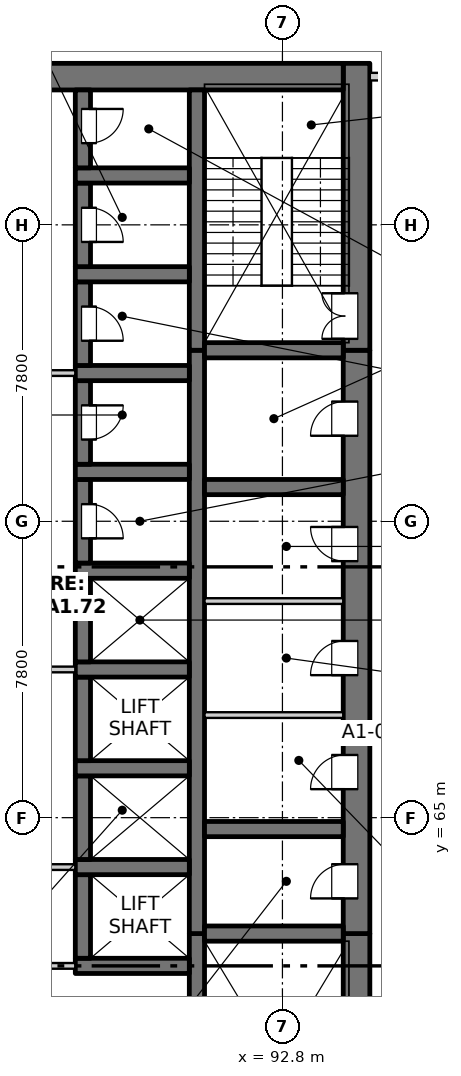
"""IFC4 building model, lengths in metres.
Left out: names, types, materials, properties, quantities, classifications, styles, units other than length and angle.
Written with IfcOpenShell. Run it as: python <this file> out.ifc"""

import sys

from ifc_helpers import new_model, si_unit, direction, frame, frame_2d, origin, place, context, subcontext, project, spatial, rectangle, extrude, element, fill, save


model = new_model("IFC4")
c1 = context("Model", 3, precision=1e-05, world=origin(), true_north=direction((0.0, 1.0)))
c2 = subcontext(c1, "Body", "Model", "MODEL_VIEW")
j1 = project(units=[si_unit("LENGTHUNIT", "METRE"), si_unit("PLANEANGLEUNIT", "RADIAN")], contexts=[c1])
p1 = place(None, origin())
s1 = spatial("IfcSite", under=j1, at=p1, CompositionType="ELEMENT")
p2 = place(p1, origin())
s2 = spatial("IfcBuilding", under=s1, at=p2, CompositionType="ELEMENT")
p3 = place(p2, frame((0.0, 0.0, 15.0)))
s3 = spatial("IfcBuildingStorey", under=s2, at=p3, CompositionType="ELEMENT", Elevation=15.0)
p4 = place(p3, frame((94.75, 54.9, -0.35), z_axis=(0.0, 0.0, 1.0), x_axis=(0.0, 1.0, 0.0)))
e1 = element("IfcWall", 1, at=p4, inside=s3, PredefinedType="SOLIDWALL", context=c2, shape_type="SweptSolid", body=[
    extrude(rectangle(XDim=7.05, YDim=0.7, at=frame_2d((3.525, 0.0))), origin(), (0.0, 0.0, 1.0), 4.6),
])
p5 = place(p4, frame((0.75, 0.0, 0.35)))
e2 = element("IfcOpeningElement", 2, at=p5, cuts=e1, PredefinedType="OPENING", context=c2, shape_type="SweptSolid", body=[
    extrude(rectangle(XDim=1.2, YDim=2.1, at=frame_2d((0.6, 1.05))), frame((0.0, 0.36, 0.0), z_axis=(0.0, -1.0, 0.0), x_axis=(1.0, 0.0, 0.0)), (0.0, 0.0, 1.0), 0.72),
])
p6 = place(p3, frame((94.75, 61.95, -0.35), z_axis=(0.0, 0.0, 1.0), x_axis=(0.0, 1.0, 0.0)))
e3 = element("IfcWall", 3, at=p6, inside=s3, PredefinedType="SOLIDWALL", context=c2, shape_type="SweptSolid", body=[
    extrude(rectangle(XDim=15.35, YDim=0.7, at=frame_2d((7.675, 0.0))), origin(), (0.0, 0.0, 1.0), 4.6),
])
p7 = place(p6, frame((0.925, 0.0, 0.35)))
e4 = element("IfcOpeningElement", 4, at=p7, cuts=e3, PredefinedType="OPENING", context=c2, shape_type="SweptSolid", body=[
    extrude(rectangle(XDim=0.9, YDim=2.1, at=frame_2d((0.45, 1.05))), frame((0.0, 0.36, 0.0), z_axis=(0.0, -1.0, 0.0), x_axis=(1.0, 0.0, 0.0)), (0.0, 0.0, 1.0), 0.72),
])
p8 = place(p6, frame((3.8, 0.0, 0.35)))
e5 = element("IfcOpeningElement", 5, at=p8, cuts=e3, PredefinedType="OPENING", context=c2, shape_type="SweptSolid", body=[
    extrude(rectangle(XDim=0.9, YDim=2.1, at=frame_2d((0.45, 1.05))), frame((0.0, 0.36, 0.0), z_axis=(0.0, -1.0, 0.0), x_axis=(1.0, 0.0, 0.0)), (0.0, 0.0, 1.0), 0.72),
])
p9 = place(p6, frame((6.8, 0.0, 0.35)))
e6 = element("IfcOpeningElement", 6, at=p9, cuts=e3, PredefinedType="OPENING", context=c2, shape_type="SweptSolid", body=[
    extrude(rectangle(XDim=0.9, YDim=2.1, at=frame_2d((0.45, 1.05))), frame((0.0, 0.36, 0.0), z_axis=(0.0, -1.0, 0.0), x_axis=(1.0, 0.0, 0.0)), (0.0, 0.0, 1.0), 0.72),
])
p10 = place(p6, frame((9.8, 0.0, 0.35)))
e7 = element("IfcOpeningElement", 7, at=p10, cuts=e3, PredefinedType="OPENING", context=c2, shape_type="SweptSolid", body=[
    extrude(rectangle(XDim=0.9, YDim=2.1, at=frame_2d((0.45, 1.05))), frame((0.0, 0.36, 0.0), z_axis=(0.0, -1.0, 0.0), x_axis=(1.0, 0.0, 0.0)), (0.0, 0.0, 1.0), 0.72),
])
p11 = place(p6, frame((13.1, 0.0, 0.35)))
e8 = element("IfcOpeningElement", 8, at=p11, cuts=e3, PredefinedType="OPENING", context=c2, shape_type="SweptSolid", body=[
    extrude(rectangle(XDim=0.9, YDim=2.1, at=frame_2d((0.45, 1.05))), frame((0.0, 0.36, 0.0), z_axis=(0.0, -1.0, 0.0), x_axis=(1.0, 0.0, 0.0)), (0.0, 0.0, 1.0), 0.72),
])
p12 = place(p3, frame((94.75, 77.3, -0.35), z_axis=(0.0, 0.0, 1.0), x_axis=(0.0, 1.0, 0.0)))
e9 = element("IfcWall", 9, at=p12, inside=s3, PredefinedType="SOLIDWALL", context=c2, shape_type="SweptSolid", body=[
    extrude(rectangle(XDim=7.55, YDim=0.7, at=frame_2d((3.775, 0.0))), origin(), (0.0, 0.0, 1.0), 4.6),
])
p13 = place(p12, frame((0.3, 0.0, 0.35)))
e10 = element("IfcOpeningElement", 10, at=p13, cuts=e9, PredefinedType="OPENING", context=c2, shape_type="SweptSolid", body=[
    extrude(rectangle(XDim=1.2, YDim=2.1, at=frame_2d((0.6, 1.05))), frame((0.0, 0.36, 0.0), z_axis=(0.0, -1.0, 0.0), x_axis=(1.0, 0.0, 0.0)), (0.0, 0.0, 1.0), 0.72),
])
p14 = place(p3, frame((75.6, 84.5, -0.35), z_axis=(0.0, 0.0, 1.0), x_axis=(1.0, 0.0, 0.0)))
e11 = element("IfcWall", 11, at=p14, inside=s3, PredefinedType="SOLIDWALL", context=c2, shape_type="SweptSolid", body=[
    extrude(rectangle(XDim=18.8, YDim=0.7, at=frame_2d((9.4, 0.0))), origin(), (0.0, 0.0, 1.0), 4.6),
])
p15 = place(p3, frame((90.55, 55.6, -0.35), z_axis=(0.0, 0.0, 1.0), x_axis=(0.0, 1.0, 0.0)))
e12 = element("IfcWall", 12, at=p15, inside=s3, PredefinedType="SOLIDWALL", context=c2, shape_type="SweptSolid", body=[
    extrude(rectangle(XDim=6.35, YDim=0.4, at=frame_2d((3.175, 0.0))), origin(), (0.0, 0.0, 1.0), 4.6),
])
p16 = place(p15, frame((0.1, 0.0, 0.35)))
e13 = element("IfcOpeningElement", 13, at=p16, cuts=e12, PredefinedType="OPENING", context=c2, shape_type="SweptSolid", body=[
    extrude(rectangle(XDim=1.2, YDim=2.1, at=frame_2d((0.6, 1.05))), frame((0.0, 0.21, 0.0), z_axis=(0.0, -1.0, 0.0), x_axis=(1.0, 0.0, 0.0)), (0.0, 0.0, 1.0), 0.42),
])
p17 = place(p3, frame((90.55, 61.95, -0.35), z_axis=(0.0, 0.0, 1.0), x_axis=(0.0, 1.0, 0.0)))
e14 = element("IfcWall", 14, at=p17, inside=s3, PredefinedType="SOLIDWALL", context=c2, shape_type="SweptSolid", body=[
    extrude(rectangle(XDim=15.35, YDim=0.4, at=frame_2d((7.675, 0.0))), origin(), (0.0, 0.0, 1.0), 4.6),
])
p18 = place(p3, frame((90.55, 77.3, -0.35), z_axis=(0.0, 0.0, 1.0), x_axis=(0.0, 1.0, 0.0)))
e15 = element("IfcWall", 15, at=p18, inside=s3, PredefinedType="SOLIDWALL", context=c2, shape_type="SweptSolid", body=[
    extrude(rectangle(XDim=6.85, YDim=0.4, at=frame_2d((3.425, 0.0))), origin(), (0.0, 0.0, 1.0), 4.6),
])
p19 = place(p3, frame((87.35, 61.1, -0.35), z_axis=(0.0, 0.0, 1.0), x_axis=(1.0, 0.0, 0.0)))
e16 = element("IfcWall", 16, at=p19, inside=s3, PredefinedType="SOLIDWALL", context=c2, shape_type="SweptSolid", body=[
    extrude(rectangle(XDim=3.0, YDim=0.4, at=frame_2d((1.5, 0.0))), origin(), (0.0, 0.0, 1.0), 4.6),
])
p20 = place(p3, frame((87.55, 61.3, -0.35), z_axis=(0.0, 0.0, 1.0), x_axis=(0.0, 1.0, 0.0)))
e17 = element("IfcWall", 17, at=p20, inside=s3, PredefinedType="SOLIDWALL", context=c2, shape_type="SweptSolid", body=[
    extrude(rectangle(XDim=2.2, YDim=0.4, at=frame_2d((1.1, 0.0))), origin(), (0.0, 0.0, 1.0), 4.6),
])
p21 = place(p3, frame((87.35, 63.7, -0.35), z_axis=(0.0, 0.0, 1.0), x_axis=(1.0, 0.0, 0.0)))
e18 = element("IfcWall", 18, at=p21, inside=s3, PredefinedType="SOLIDWALL", context=c2, shape_type="SweptSolid", body=[
    extrude(rectangle(XDim=3.0, YDim=0.4, at=frame_2d((1.5, 0.0))), origin(), (0.0, 0.0, 1.0), 4.6),
])
p22 = place(p3, frame((87.55, 63.9, -0.35), z_axis=(0.0, 0.0, 1.0), x_axis=(0.0, 1.0, 0.0)))
e19 = element("IfcWall", 19, at=p22, inside=s3, PredefinedType="SOLIDWALL", context=c2, shape_type="SweptSolid", body=[
    extrude(rectangle(XDim=2.2, YDim=0.4, at=frame_2d((1.1, 0.0))), origin(), (0.0, 0.0, 1.0), 4.6),
])
p23 = place(p3, frame((87.35, 66.3, -0.35), z_axis=(0.0, 0.0, 1.0), x_axis=(1.0, 0.0, 0.0)))
e20 = element("IfcWall", 20, at=p23, inside=s3, PredefinedType="SOLIDWALL", context=c2, shape_type="SweptSolid", body=[
    extrude(rectangle(XDim=3.0, YDim=0.4, at=frame_2d((1.5, 0.0))), origin(), (0.0, 0.0, 1.0), 4.6),
])
p24 = place(p3, frame((87.55, 66.5, -0.35), z_axis=(0.0, 0.0, 1.0), x_axis=(0.0, 1.0, 0.0)))
e21 = element("IfcWall", 21, at=p24, inside=s3, PredefinedType="SOLIDWALL", context=c2, shape_type="SweptSolid", body=[
    extrude(rectangle(XDim=2.2, YDim=0.4, at=frame_2d((1.1, 0.0))), origin(), (0.0, 0.0, 1.0), 4.6),
])
p25 = place(p3, frame((87.35, 68.9, -0.35), z_axis=(0.0, 0.0, 1.0), x_axis=(1.0, 0.0, 0.0)))
e22 = element("IfcWall", 22, at=p25, inside=s3, PredefinedType="SOLIDWALL", context=c2, shape_type="SweptSolid", body=[
    extrude(rectangle(XDim=3.0, YDim=0.4, at=frame_2d((1.5, 0.0))), origin(), (0.0, 0.0, 1.0), 4.6),
])
p26 = place(p3, frame((87.55, 69.1, -0.35), z_axis=(0.0, 0.0, 1.0), x_axis=(0.0, 1.0, 0.0)))
e23 = element("IfcWall", 23, at=p26, inside=s3, PredefinedType="SOLIDWALL", context=c2, shape_type="SweptSolid", body=[
    extrude(rectangle(XDim=2.2, YDim=0.4, at=frame_2d((1.1, 0.0))), origin(), (0.0, 0.0, 1.0), 4.6),
])
p27 = place(p3, frame((87.35, 71.5, -0.35), z_axis=(0.0, 0.0, 1.0), x_axis=(1.0, 0.0, 0.0)))
e24 = element("IfcWall", 24, at=p27, inside=s3, PredefinedType="SOLIDWALL", context=c2, shape_type="SweptSolid", body=[
    extrude(rectangle(XDim=3.0, YDim=0.4, at=frame_2d((1.5, 0.0))), origin(), (0.0, 0.0, 1.0), 4.6),
])
p28 = place(p3, frame((87.55, 71.7, -0.35), z_axis=(0.0, 0.0, 1.0), x_axis=(0.0, 1.0, 0.0)))
e25 = element("IfcWall", 25, at=p28, inside=s3, PredefinedType="SOLIDWALL", context=c2, shape_type="SweptSolid", body=[
    extrude(rectangle(XDim=2.2, YDim=0.4, at=frame_2d((1.1, 0.0))), origin(), (0.0, 0.0, 1.0), 4.6),
])
p29 = place(p28, frame((0.65, 0.0, 0.35)))
e26 = element("IfcOpeningElement", 26, at=p29, cuts=e25, PredefinedType="OPENING", context=c2, shape_type="SweptSolid", body=[
    extrude(rectangle(XDim=0.9, YDim=2.1, at=frame_2d((0.45, 1.05))), frame((0.0, 0.21, 0.0), z_axis=(0.0, -1.0, 0.0), x_axis=(1.0, 0.0, 0.0)), (0.0, 0.0, 1.0), 0.42),
])
p30 = place(p3, frame((87.35, 74.1, -0.35), z_axis=(0.0, 0.0, 1.0), x_axis=(1.0, 0.0, 0.0)))
e27 = element("IfcWall", 27, at=p30, inside=s3, PredefinedType="SOLIDWALL", context=c2, shape_type="SweptSolid", body=[
    extrude(rectangle(XDim=3.0, YDim=0.4, at=frame_2d((1.5, 0.0))), origin(), (0.0, 0.0, 1.0), 4.6),
])
p31 = place(p3, frame((87.55, 74.3, -0.35), z_axis=(0.0, 0.0, 1.0), x_axis=(0.0, 1.0, 0.0)))
e28 = element("IfcWall", 28, at=p31, inside=s3, PredefinedType="SOLIDWALL", context=c2, shape_type="SweptSolid", body=[
    extrude(rectangle(XDim=2.2, YDim=0.4, at=frame_2d((1.1, 0.0))), origin(), (0.0, 0.0, 1.0), 4.6),
])
p32 = place(p31, frame((0.65, 0.0, 0.35)))
e29 = element("IfcOpeningElement", 29, at=p32, cuts=e28, PredefinedType="OPENING", context=c2, shape_type="SweptSolid", body=[
    extrude(rectangle(XDim=0.9, YDim=2.1, at=frame_2d((0.45, 1.05))), frame((0.0, 0.21, 0.0), z_axis=(0.0, -1.0, 0.0), x_axis=(1.0, 0.0, 0.0)), (0.0, 0.0, 1.0), 0.42),
])
p33 = place(p3, frame((87.35, 76.7, -0.35), z_axis=(0.0, 0.0, 1.0), x_axis=(1.0, 0.0, 0.0)))
e30 = element("IfcWall", 30, at=p33, inside=s3, PredefinedType="SOLIDWALL", context=c2, shape_type="SweptSolid", body=[
    extrude(rectangle(XDim=3.0, YDim=0.4, at=frame_2d((1.5, 0.0))), origin(), (0.0, 0.0, 1.0), 4.6),
])
p34 = place(p3, frame((87.55, 76.9, -0.35), z_axis=(0.0, 0.0, 1.0), x_axis=(0.0, 1.0, 0.0)))
e31 = element("IfcWall", 31, at=p34, inside=s3, PredefinedType="SOLIDWALL", context=c2, shape_type="SweptSolid", body=[
    extrude(rectangle(XDim=2.2, YDim=0.4, at=frame_2d((1.1, 0.0))), origin(), (0.0, 0.0, 1.0), 4.6),
])
p35 = place(p34, frame((0.65, 0.0, 0.35)))
e32 = element("IfcOpeningElement", 32, at=p35, cuts=e31, PredefinedType="OPENING", context=c2, shape_type="SweptSolid", body=[
    extrude(rectangle(XDim=0.9, YDim=2.1, at=frame_2d((0.45, 1.05))), frame((0.0, 0.21, 0.0), z_axis=(0.0, -1.0, 0.0), x_axis=(1.0, 0.0, 0.0)), (0.0, 0.0, 1.0), 0.42),
])
p36 = place(p3, frame((87.35, 79.3, -0.35), z_axis=(0.0, 0.0, 1.0), x_axis=(1.0, 0.0, 0.0)))
e33 = element("IfcWall", 33, at=p36, inside=s3, PredefinedType="SOLIDWALL", context=c2, shape_type="SweptSolid", body=[
    extrude(rectangle(XDim=3.0, YDim=0.4, at=frame_2d((1.5, 0.0))), origin(), (0.0, 0.0, 1.0), 4.6),
])
p37 = place(p3, frame((87.55, 79.5, -0.35), z_axis=(0.0, 0.0, 1.0), x_axis=(0.0, 1.0, 0.0)))
e34 = element("IfcWall", 34, at=p37, inside=s3, PredefinedType="SOLIDWALL", context=c2, shape_type="SweptSolid", body=[
    extrude(rectangle(XDim=2.2, YDim=0.4, at=frame_2d((1.1, 0.0))), origin(), (0.0, 0.0, 1.0), 4.6),
])
p38 = place(p37, frame((0.65, 0.0, 0.35)))
e35 = element("IfcOpeningElement", 35, at=p38, cuts=e34, PredefinedType="OPENING", context=c2, shape_type="SweptSolid", body=[
    extrude(rectangle(XDim=0.9, YDim=2.1, at=frame_2d((0.45, 1.05))), frame((0.0, 0.21, 0.0), z_axis=(0.0, -1.0, 0.0), x_axis=(1.0, 0.0, 0.0)), (0.0, 0.0, 1.0), 0.42),
])
p39 = place(p3, frame((87.35, 81.9, -0.35), z_axis=(0.0, 0.0, 1.0), x_axis=(1.0, 0.0, 0.0)))
e36 = element("IfcWall", 36, at=p39, inside=s3, PredefinedType="SOLIDWALL", context=c2, shape_type="SweptSolid", body=[
    extrude(rectangle(XDim=3.0, YDim=0.4, at=frame_2d((1.5, 0.0))), origin(), (0.0, 0.0, 1.0), 4.6),
])
p40 = place(p3, frame((87.55, 82.1, -0.35), z_axis=(0.0, 0.0, 1.0), x_axis=(0.0, 1.0, 0.0)))
e37 = element("IfcWall", 37, at=p40, inside=s3, PredefinedType="SOLIDWALL", context=c2, shape_type="SweptSolid", body=[
    extrude(rectangle(XDim=2.05, YDim=0.4, at=frame_2d((1.025, 0.0))), origin(), (0.0, 0.0, 1.0), 4.6),
])
p41 = place(p40, frame((0.65, 0.0, 0.35)))
e38 = element("IfcOpeningElement", 38, at=p41, cuts=e37, PredefinedType="OPENING", context=c2, shape_type="SweptSolid", body=[
    extrude(rectangle(XDim=0.9, YDim=2.1, at=frame_2d((0.45, 1.05))), frame((0.0, 0.21, 0.0), z_axis=(0.0, -1.0, 0.0), x_axis=(1.0, 0.0, 0.0)), (0.0, 0.0, 1.0), 0.42),
])
for number, where, z_axis, x_axis in (
    (39, (90.75, 61.95, -0.35), (0.0, 0.0, 1.0), (1.0, 0.0, 0.0)),
    (40, (90.75, 64.7, -0.35), (0.0, 0.0, 1.0), (1.0, 0.0, 0.0)),
    (41, (90.75, 73.7, -0.35), (0.0, 0.0, 1.0), (1.0, 0.0, 0.0)),
    (42, (90.75, 77.3, -0.35), (0.0, 0.0, 1.0), (1.0, 0.0, 0.0)),
):
    element("IfcWall", number, at=place(p3, frame(where, z_axis=z_axis, x_axis=x_axis)), inside=s3, PredefinedType="SOLIDWALL", context=c2, shape_type="SweptSolid", body=[
        extrude(rectangle(XDim=3.65, YDim=0.4, at=frame_2d((1.825, 0.0))), origin(), (0.0, 0.0, 1.0), 4.6),
    ])
p42 = place(p3, frame((82.65, 61.1, 0.0), z_axis=(0.0, 0.0, 1.0), x_axis=(1.0, 0.0, 0.0)))
e43 = element("IfcWall", 43, at=p42, inside=s3, PredefinedType="PARTITIONING", context=c2, shape_type="SweptSolid", body=[
    extrude(rectangle(XDim=4.7, YDim=0.15, at=frame_2d((2.35, 0.0))), origin(), (0.0, 0.0, 1.0), 4.25),
])
p43 = place(p42, frame((1.45, 0.0, 0.0)))
e44 = element("IfcOpeningElement", 44, at=p43, cuts=e43, PredefinedType="OPENING", context=c2, shape_type="SweptSolid", body=[
    extrude(rectangle(XDim=1.8, YDim=2.1, at=frame_2d((0.9, 1.05))), frame((0.0, 0.085, 0.0), z_axis=(0.0, -1.0, 0.0), x_axis=(1.0, 0.0, 0.0)), (0.0, 0.0, 1.0), 0.17),
])
p44 = place(p3, frame((82.65, 63.7, 0.0), z_axis=(0.0, 0.0, 1.0), x_axis=(1.0, 0.0, 0.0)))
e45 = element("IfcWall", 45, at=p44, inside=s3, PredefinedType="PARTITIONING", context=c2, shape_type="SweptSolid", body=[
    extrude(rectangle(XDim=4.7, YDim=0.15, at=frame_2d((2.35, 0.0))), origin(), (0.0, 0.0, 1.0), 4.25),
])
p45 = place(p44, frame((1.45, 0.0, 0.0)))
e46 = element("IfcOpeningElement", 46, at=p45, cuts=e45, PredefinedType="OPENING", context=c2, shape_type="SweptSolid", body=[
    extrude(rectangle(XDim=1.8, YDim=2.1, at=frame_2d((0.9, 1.05))), frame((0.0, 0.085, 0.0), z_axis=(0.0, -1.0, 0.0), x_axis=(1.0, 0.0, 0.0)), (0.0, 0.0, 1.0), 0.17),
])
p46 = place(p3, frame((90.75, 67.7, 0.0), z_axis=(0.0, 0.0, 1.0), x_axis=(1.0, 0.0, 0.0)))
e47 = element("IfcWall", 47, at=p46, inside=s3, PredefinedType="PARTITIONING", context=c2, shape_type="SweptSolid", body=[
    extrude(rectangle(XDim=3.65, YDim=0.15, at=frame_2d((1.825, 0.0))), origin(), (0.0, 0.0, 1.0), 4.25),
])
p47 = place(p3, frame((82.65, 68.9, 0.0), z_axis=(0.0, 0.0, 1.0), x_axis=(1.0, 0.0, 0.0)))
e48 = element("IfcWall", 48, at=p47, inside=s3, PredefinedType="PARTITIONING", context=c2, shape_type="SweptSolid", body=[
    extrude(rectangle(XDim=4.7, YDim=0.15, at=frame_2d((2.35, 0.0))), origin(), (0.0, 0.0, 1.0), 4.25),
])
p48 = place(p47, frame((1.45, 0.0, 0.0)))
e49 = element("IfcOpeningElement", 49, at=p48, cuts=e48, PredefinedType="OPENING", context=c2, shape_type="SweptSolid", body=[
    extrude(rectangle(XDim=1.8, YDim=2.1, at=frame_2d((0.9, 1.05))), frame((0.0, 0.085, 0.0), z_axis=(0.0, -1.0, 0.0), x_axis=(1.0, 0.0, 0.0)), (0.0, 0.0, 1.0), 0.17),
])
p49 = place(p3, frame((90.75, 70.7, 0.0), z_axis=(0.0, 0.0, 1.0), x_axis=(1.0, 0.0, 0.0)))
e50 = element("IfcWall", 50, at=p49, inside=s3, PredefinedType="PARTITIONING", context=c2, shape_type="SweptSolid", body=[
    extrude(rectangle(XDim=3.65, YDim=0.15, at=frame_2d((1.825, 0.0))), origin(), (0.0, 0.0, 1.0), 4.25),
])
p50 = place(p3, frame((82.65, 76.7, 0.0), z_axis=(0.0, 0.0, 1.0), x_axis=(1.0, 0.0, 0.0)))
e51 = element("IfcWall", 51, at=p50, inside=s3, PredefinedType="PARTITIONING", context=c2, shape_type="SweptSolid", body=[
    extrude(rectangle(XDim=4.7, YDim=0.15, at=frame_2d((2.35, 0.0))), origin(), (0.0, 0.0, 1.0), 4.25),
])
p51 = place(p50, frame((1.45, 0.0, 0.0)))
e52 = element("IfcOpeningElement", 52, at=p51, cuts=e51, PredefinedType="OPENING", context=c2, shape_type="SweptSolid", body=[
    extrude(rectangle(XDim=1.8, YDim=2.1, at=frame_2d((0.9, 1.05))), frame((0.0, 0.085, 0.0), z_axis=(0.0, -1.0, 0.0), x_axis=(1.0, 0.0, 0.0)), (0.0, 0.0, 1.0), 0.17),
])
p52 = place(p3, frame((95.1, 84.5, 0.0), z_axis=(0.0, 0.0, 1.0), x_axis=(1.0, 0.0, 0.0)))
e53 = element("IfcWall", 53, at=p52, inside=s3, PredefinedType="PARTITIONING", context=c2, shape_type="SweptSolid", body=[
    extrude(rectangle(XDim=1.7, YDim=0.2, at=frame_2d((0.85, 0.0))), origin(), (0.0, 0.0, 1.0), 4.25),
])
p53 = place(p7, origin())
e54 = element("IfcDoor", 54, at=p53, inside=s3, OperationType="SINGLE_SWING_LEFT", PredefinedType="DOOR", context=c2, shape_type="SweptSolid", body=[
    extrude(rectangle(XDim=0.9, YDim=2.1, at=frame_2d((0.45, 1.05))), frame((0.0, 0.335, 0.0), z_axis=(0.0, -1.0, 0.0), x_axis=(1.0, 0.0, 0.0)), (0.0, 0.0, 1.0), 0.05),
])
fill(e4, e54)
p54 = place(p8, origin())
e55 = element("IfcDoor", 55, at=p54, inside=s3, OperationType="SINGLE_SWING_LEFT", PredefinedType="DOOR", context=c2, shape_type="SweptSolid", body=[
    extrude(rectangle(XDim=0.9, YDim=2.1, at=frame_2d((0.45, 1.05))), frame((0.0, 0.335, 0.0), z_axis=(0.0, -1.0, 0.0), x_axis=(1.0, 0.0, 0.0)), (0.0, 0.0, 1.0), 0.05),
])
fill(e5, e55)
p55 = place(p9, origin())
e56 = element("IfcDoor", 56, at=p55, inside=s3, OperationType="SINGLE_SWING_LEFT", PredefinedType="DOOR", context=c2, shape_type="SweptSolid", body=[
    extrude(rectangle(XDim=0.9, YDim=2.1, at=frame_2d((0.45, 1.05))), frame((0.0, 0.335, 0.0), z_axis=(0.0, -1.0, 0.0), x_axis=(1.0, 0.0, 0.0)), (0.0, 0.0, 1.0), 0.05),
])
fill(e6, e56)
p56 = place(p10, origin())
e57 = element("IfcDoor", 57, at=p56, inside=s3, OperationType="SINGLE_SWING_RIGHT", PredefinedType="DOOR", context=c2, shape_type="SweptSolid", body=[
    extrude(rectangle(XDim=0.9, YDim=2.1, at=frame_2d((0.45, 1.05))), frame((0.0, 0.335, 0.0), z_axis=(0.0, -1.0, 0.0), x_axis=(1.0, 0.0, 0.0)), (0.0, 0.0, 1.0), 0.05),
])
fill(e7, e57)
p57 = place(p29, origin())
e58 = element("IfcDoor", 58, at=p57, inside=s3, OperationType="SINGLE_SWING_RIGHT", PredefinedType="DOOR", context=c2, shape_type="SweptSolid", body=[
    extrude(rectangle(XDim=0.9, YDim=2.1, at=frame_2d((0.45, 1.05))), frame((0.0, -0.135, 0.0), z_axis=(0.0, -1.0, 0.0), x_axis=(1.0, 0.0, 0.0)), (0.0, 0.0, 1.0), 0.05),
])
fill(e26, e58)
p58 = place(p32, origin())
e59 = element("IfcDoor", 59, at=p58, inside=s3, OperationType="SINGLE_SWING_LEFT", PredefinedType="DOOR", context=c2, shape_type="SweptSolid", body=[
    extrude(rectangle(XDim=0.9, YDim=2.1, at=frame_2d((0.45, 1.05))), frame((0.0, -0.135, 0.0), z_axis=(0.0, -1.0, 0.0), x_axis=(1.0, 0.0, 0.0)), (0.0, 0.0, 1.0), 0.05),
])
fill(e29, e59)
p59 = place(p11, origin())
e60 = element("IfcDoor", 60, at=p59, inside=s3, OperationType="SINGLE_SWING_LEFT", PredefinedType="DOOR", context=c2, shape_type="SweptSolid", body=[
    extrude(rectangle(XDim=0.9, YDim=2.1, at=frame_2d((0.45, 1.05))), frame((0.0, 0.335, 0.0), z_axis=(0.0, -1.0, 0.0), x_axis=(1.0, 0.0, 0.0)), (0.0, 0.0, 1.0), 0.05),
])
fill(e8, e60)
p60 = place(p35, origin())
e61 = element("IfcDoor", 61, at=p60, inside=s3, OperationType="SINGLE_SWING_RIGHT", PredefinedType="DOOR", context=c2, shape_type="SweptSolid", body=[
    extrude(rectangle(XDim=0.9, YDim=2.1, at=frame_2d((0.45, 1.05))), frame((0.0, -0.135, 0.0), z_axis=(0.0, -1.0, 0.0), x_axis=(1.0, 0.0, 0.0)), (0.0, 0.0, 1.0), 0.05),
])
fill(e32, e61)
p61 = place(p13, origin())
e62 = element("IfcDoor", 62, at=p61, inside=s3, OperationType="DOUBLE_DOOR_SINGLE_SWING", PredefinedType="DOOR", context=c2, shape_type="SweptSolid", body=[
    extrude(rectangle(XDim=1.2, YDim=2.1, at=frame_2d((0.6, 1.05))), frame((0.0, 0.335, 0.0), z_axis=(0.0, -1.0, 0.0), x_axis=(1.0, 0.0, 0.0)), (0.0, 0.0, 1.0), 0.05),
])
fill(e10, e62)
p62 = place(p38, origin())
e63 = element("IfcDoor", 63, at=p62, inside=s3, OperationType="SINGLE_SWING_RIGHT", PredefinedType="DOOR", context=c2, shape_type="SweptSolid", body=[
    extrude(rectangle(XDim=0.9, YDim=2.1, at=frame_2d((0.45, 1.05))), frame((0.0, -0.135, 0.0), z_axis=(0.0, -1.0, 0.0), x_axis=(1.0, 0.0, 0.0)), (0.0, 0.0, 1.0), 0.05),
])
fill(e35, e63)
p63 = place(p41, origin())
e64 = element("IfcDoor", 64, at=p63, inside=s3, OperationType="SINGLE_SWING_LEFT", PredefinedType="DOOR", context=c2, shape_type="SweptSolid", body=[
    extrude(rectangle(XDim=0.9, YDim=2.1, at=frame_2d((0.45, 1.05))), frame((0.0, -0.135, 0.0), z_axis=(0.0, -1.0, 0.0), x_axis=(1.0, 0.0, 0.0)), (0.0, 0.0, 1.0), 0.05),
])
fill(e38, e64)
save(model, sys.argv[1])
